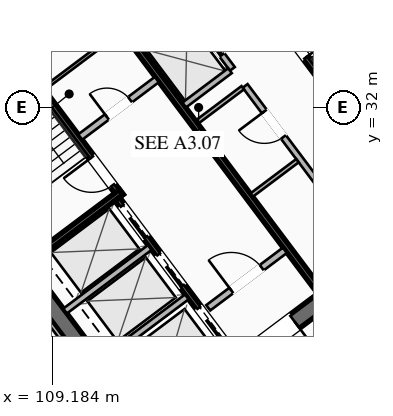
"""IFC4 building model, lengths in metres.
Left out: names, types, materials, properties, quantities, classifications, styles, units other than length and angle.
Written with IfcOpenShell. Run it as: python <this file> out.ifc"""

import sys

from ifc_helpers import new_model, si_unit, direction, frame, frame_2d, origin, place, context, subcontext, project, spatial, rectangle, extrude, element, fill, save


model = new_model("IFC4")
c1 = context("Model", 3, precision=1e-05, world=origin(), true_north=direction((0.0, 1.0)))
c2 = subcontext(c1, "Body", "Model", "MODEL_VIEW")
j1 = project(units=[si_unit("LENGTHUNIT", "METRE"), si_unit("PLANEANGLEUNIT", "RADIAN")], contexts=[c1])
p1 = place(None, origin())
s1 = spatial("IfcSite", under=j1, at=p1, CompositionType="ELEMENT")
p2 = place(p1, origin())
s2 = spatial("IfcBuilding", under=s1, at=p2, CompositionType="ELEMENT")
p3 = place(p2, frame((0.0, 0.0, 171.2)))
s3 = spatial("IfcBuildingStorey", under=s2, at=p3, CompositionType="ELEMENT", Elevation=171.2)
for number, where, z_axis, x_axis in (
    (1, (112.436, 21.077, 0.0), (0.0, 0.0, 1.0), (-0.6, 0.8, 0.0)),
    (2, (115.564, 42.923, 0.0), (0.0, 0.0, 1.0), (0.6, -0.8, 0.0)),
):
    element("IfcWall", number, at=place(p3, frame(where, z_axis=z_axis, x_axis=x_axis)), inside=s3, PredefinedType="SHEAR", context=c2, shape_type="SweptSolid", body=[
        extrude(rectangle(XDim=15.6, YDim=0.55, at=frame_2d((7.8, 0.0))), origin(), (0.0, 0.0, 1.0), 3.55),
    ])
p4 = place(p3, frame((124.539, 30.498, 0.0), z_axis=(0.0, 0.0, 1.0), x_axis=(-0.799998054672, -0.600002593761, 0.0)))
e3 = element("IfcWall", 3, at=p4, inside=s3, PredefinedType="SHEAR", context=c2, shape_type="SweptSolid", body=[
    extrude(rectangle(XDim=15.06, YDim=0.55, at=frame_2d((7.53, 0.0))), origin(), (0.0, 0.0, 1.0), 3.55),
])
p5 = place(p4, frame((9.23, 0.0, 0.0)))
e4 = element("IfcOpeningElement", 4, at=p5, cuts=e3, PredefinedType="OPENING", context=c2, shape_type="SweptSolid", body=[
    extrude(rectangle(XDim=1.25, YDim=2.25, at=frame_2d((0.625, 1.125))), frame((0.0, 0.285, 0.0), z_axis=(0.0, -1.0, 0.0), x_axis=(1.0, 0.0, 0.0)), (0.0, 0.0, 1.0), 0.57),
])
p6 = place(p4, frame((4.18, 0.0, 0.0)))
e5 = element("IfcOpeningElement", 5, at=p6, cuts=e3, PredefinedType="OPENING", context=c2, shape_type="SweptSolid", body=[
    extrude(rectangle(XDim=1.25, YDim=2.25, at=frame_2d((0.625, 1.125))), frame((0.0, 0.285, 0.0), z_axis=(0.0, -1.0, 0.0), x_axis=(1.0, 0.0, 0.0)), (0.0, 0.0, 1.0), 0.57),
])
p7 = place(p3, frame((103.461, 33.502, 0.0), z_axis=(0.0, 0.0, 1.0), x_axis=(0.799998054672, 0.600002593761, 0.0)))
e6 = element("IfcWall", 6, at=p7, inside=s3, PredefinedType="SHEAR", context=c2, shape_type="SweptSolid", body=[
    extrude(rectangle(XDim=15.06, YDim=0.55, at=frame_2d((7.53, 0.0))), origin(), (0.0, 0.0, 1.0), 3.55),
])
p8 = place(p7, frame((4.58, 0.0, 0.0)))
e7 = element("IfcOpeningElement", 7, at=p8, cuts=e6, PredefinedType="OPENING", context=c2, shape_type="SweptSolid", body=[
    extrude(rectangle(XDim=1.25, YDim=2.25, at=frame_2d((0.625, 1.125))), frame((0.0, 0.285, 0.0), z_axis=(0.0, -1.0, 0.0), x_axis=(1.0, 0.0, 0.0)), (0.0, 0.0, 1.0), 0.57),
])
p9 = place(p7, frame((9.63, 0.0, 0.0)))
e8 = element("IfcOpeningElement", 8, at=p9, cuts=e6, PredefinedType="OPENING", context=c2, shape_type="SweptSolid", body=[
    extrude(rectangle(XDim=1.25, YDim=2.25, at=frame_2d((0.625, 1.125))), frame((0.0, 0.285, 0.0), z_axis=(0.0, -1.0, 0.0), x_axis=(1.0, 0.0, 0.0)), (0.0, 0.0, 1.0), 0.57),
])
p10 = place(p3, frame((111.44, 29.08, 0.0), z_axis=(0.0, 0.0, 1.0), x_axis=(-0.59999029481, 0.8000072788, 0.0)))
e9 = element("IfcWall", 9, at=p10, inside=s3, PredefinedType="SHEAR", context=c2, shape_type="SweptSolid", body=[
    extrude(rectangle(XDim=8.05, YDim=0.2, at=frame_2d((4.025, 0.0))), origin(), (0.0, 0.0, 1.0), 3.37),
])
p11 = place(p10, frame((0.45, 0.0, 0.0)))
e10 = element("IfcOpeningElement", 10, at=p11, cuts=e9, PredefinedType="OPENING", context=c2, shape_type="SweptSolid", body=[
    extrude(rectangle(XDim=1.15, YDim=2.2, at=frame_2d((0.575, 1.1))), frame((0.0, 0.11, 0.0), z_axis=(0.0, -1.0, 0.0), x_axis=(1.0, 0.0, 0.0)), (0.0, 0.0, 1.0), 0.22),
])
p12 = place(p3, frame((108.396, 26.922, 0.0), z_axis=(0.0, 0.0, 1.0), x_axis=(0.800015298837, 0.599979601008, 0.0)))
e11 = element("IfcWall", 11, at=p12, inside=s3, PredefinedType="SHEAR", context=c2, shape_type="SweptSolid", body=[
    extrude(rectangle(XDim=3.83, YDim=0.2, at=frame_2d((1.915, 0.0))), origin(), (0.0, 0.0, 1.0), 3.37),
])
p13 = place(p3, frame((116.56, 34.92, 0.0), z_axis=(0.0, 0.0, 1.0), x_axis=(0.59999029481, -0.8000072788, 0.0)))
e12 = element("IfcWall", 12, at=p13, inside=s3, PredefinedType="SHEAR", context=c2, shape_type="SweptSolid", body=[
    extrude(rectangle(XDim=8.05, YDim=0.2, at=frame_2d((4.025, 0.0))), origin(), (0.0, 0.0, 1.0), 3.37),
])
p14 = place(p13, frame((0.45, 0.0, 0.0)))
e13 = element("IfcOpeningElement", 13, at=p14, cuts=e12, PredefinedType="OPENING", context=c2, shape_type="SweptSolid", body=[
    extrude(rectangle(XDim=1.15, YDim=2.2, at=frame_2d((0.575, 1.1))), frame((0.0, 0.11, 0.0), z_axis=(0.0, -1.0, 0.0), x_axis=(1.0, 0.0, 0.0)), (0.0, 0.0, 1.0), 0.22),
])
p15 = place(p3, frame((117.998, 25.936, 0.0), z_axis=(0.0, 0.0, 1.0), x_axis=(-0.600002693989, 0.799997979501, 0.0)))
e14 = element("IfcWall", 14, at=p15, inside=s3, PredefinedType="SHEAR", context=c2, shape_type="SweptSolid", body=[
    extrude(rectangle(XDim=14.5, YDim=0.2, at=frame_2d((7.25, 0.0))), origin(), (0.0, 0.0, 1.0), 3.37),
])
p16 = place(p3, frame((110.104, 31.028, 0.0), z_axis=(0.0, 0.0, 1.0), x_axis=(0.800018601094, 0.59997519774, 0.0)))
e15 = element("IfcWall", 15, at=p16, inside=s3, PredefinedType="SOLIDWALL", context=c2, shape_type="SweptSolid", body=[
    extrude(rectangle(XDim=3.15, YDim=0.22, at=frame_2d((1.575, 0.0))), origin(), (0.0, 0.0, 1.0), 2.723),
])
p17 = place(p16, frame((1.1, 0.0, 0.0)))
e16 = element("IfcOpeningElement", 16, at=p17, cuts=e15, PredefinedType="OPENING", context=c2, shape_type="SweptSolid", body=[
    extrude(rectangle(XDim=0.95, YDim=2.05, at=frame_2d((0.475, 1.025))), frame((0.0, 0.12, 0.0), z_axis=(0.0, -1.0, 0.0), x_axis=(1.0, 0.0, 0.0)), (0.0, 0.0, 1.0), 0.24),
])
p18 = place(p3, frame((114.316, 25.412, 0.0), z_axis=(0.0, 0.0, 1.0), x_axis=(0.800018601094, 0.59997519774, 0.0)))
e17 = element("IfcWall", 17, at=p18, inside=s3, PredefinedType="SOLIDWALL", context=c2, shape_type="SweptSolid", body=[
    extrude(rectangle(XDim=3.15, YDim=0.22, at=frame_2d((1.575, 0.0))), origin(), (0.0, 0.0, 1.0), 2.723),
])
p19 = place(p18, frame((0.95, 0.0, 0.0)))
e18 = element("IfcOpeningElement", 18, at=p19, cuts=e17, PredefinedType="OPENING", context=c2, shape_type="SweptSolid", body=[
    extrude(rectangle(XDim=1.25, YDim=2.25, at=frame_2d((0.625, 1.125))), frame((0.0, 0.12, 0.0), z_axis=(0.0, -1.0, 0.0), x_axis=(1.0, 0.0, 0.0)), (0.0, 0.0, 1.0), 0.24),
])
p20 = place(p3, frame((115.19, 23.83, 0.0), z_axis=(0.0, 0.0, 1.0), x_axis=(-0.599993943644, 0.800004542231, 0.0)))
e19 = element("IfcWall", 19, at=p20, inside=s3, PredefinedType="SHEAR", context=c2, shape_type="SweptSolid", body=[
    extrude(rectangle(XDim=6.45, YDim=0.2, at=frame_2d((3.225, 0.0))), origin(), (0.0, 0.0, 1.0), 3.37),
])
p21 = place(p20, frame((4.875, 0.0, 0.0)))
e20 = element("IfcOpeningElement", 20, at=p21, cuts=e19, PredefinedType="OPENING", context=c2, shape_type="SweptSolid", body=[
    extrude(rectangle(XDim=1.3, YDim=2.25, at=frame_2d((0.65, 1.125))), frame((0.0, 0.11, 0.0), z_axis=(0.0, -1.0, 0.0), x_axis=(1.0, 0.0, 0.0)), (0.0, 0.0, 1.0), 0.22),
])
p22 = place(p20, frame((2.875, 0.0, 0.0)))
e21 = element("IfcOpeningElement", 21, at=p22, cuts=e19, PredefinedType="OPENING", context=c2, shape_type="SweptSolid", body=[
    extrude(rectangle(XDim=1.3, YDim=2.25, at=frame_2d((0.65, 1.125))), frame((0.0, 0.11, 0.0), z_axis=(0.0, -1.0, 0.0), x_axis=(1.0, 0.0, 0.0)), (0.0, 0.0, 1.0), 0.22),
])
p23 = place(p20, frame((0.675, 0.0, 0.0)))
e22 = element("IfcOpeningElement", 22, at=p23, cuts=e19, PredefinedType="OPENING", context=c2, shape_type="SweptSolid", body=[
    extrude(rectangle(XDim=1.3, YDim=2.25, at=frame_2d((0.65, 1.125))), frame((0.0, 0.11, 0.0), z_axis=(0.0, -1.0, 0.0), x_axis=(1.0, 0.0, 0.0)), (0.0, 0.0, 1.0), 0.22),
])
for number, where, z_axis, x_axis in (
    (23, (110.826, 23.682, 0.0), (0.0, 0.0, 1.0), (0.8, 0.6, 0.0)),
    (24, (109.608, 25.306, 0.0), (0.0, 0.0, 1.0), (0.8, 0.6, 0.0)),
):
    element("IfcWall", number, at=place(p3, frame(where, z_axis=z_axis, x_axis=x_axis)), inside=s3, PredefinedType="SOLIDWALL", context=c2, shape_type="SweptSolid", body=[
        extrude(rectangle(XDim=3.48, YDim=0.2, at=frame_2d((1.74, 0.0))), origin(), (0.0, 0.0, 1.0), 3.37),
    ])
p24 = place(p3, frame((108.91, 32.62, 0.0), z_axis=(0.0, 0.0, 1.0), x_axis=(0.800018601094, 0.59997519774, 0.0)))
e25 = element("IfcWall", 25, at=p24, inside=s3, PredefinedType="PARTITIONING", context=c2, shape_type="SweptSolid", body=[
    extrude(rectangle(XDim=3.15, YDim=0.11, at=frame_2d((1.575, 0.0))), origin(), (0.0, 0.0, 1.0), 2.723),
])
p25 = place(p3, frame((119.67, 27.19, 0.0), z_axis=(0.0, 0.0, 1.0), x_axis=(-0.599988677396, 0.800008491828, 0.0)))
e26 = element("IfcWall", 26, at=p25, inside=s3, PredefinedType="SOLIDWALL", context=c2, shape_type="SweptSolid", body=[
    extrude(rectangle(XDim=6.9, YDim=0.2, at=frame_2d((3.45, 0.0))), origin(), (0.0, 0.0, 1.0), 2.723),
])
p26 = place(p25, frame((0.85, 0.0, 0.0)))
e27 = element("IfcOpeningElement", 27, at=p26, cuts=e26, PredefinedType="OPENING", context=c2, shape_type="SweptSolid", body=[
    extrude(rectangle(XDim=0.95, YDim=2.05, at=frame_2d((0.475, 1.025))), frame((0.0, 0.11, 0.0), z_axis=(0.0, -1.0, 0.0), x_axis=(1.0, 0.0, 0.0)), (0.0, 0.0, 1.0), 0.22),
])
p27 = place(p25, frame((4.8, 0.0, 0.0)))
e28 = element("IfcOpeningElement", 28, at=p27, cuts=e26, PredefinedType="OPENING", context=c2, shape_type="SweptSolid", body=[
    extrude(rectangle(XDim=1.05, YDim=2.2, at=frame_2d((0.525, 1.1))), frame((0.0, 0.11, 0.0), z_axis=(0.0, -1.0, 0.0), x_axis=(1.0, 0.0, 0.0)), (0.0, 0.0, 1.0), 0.22),
])
for number, where, z_axis, x_axis in (
    (29, (113.946, 31.522, 0.0), (0.0, 0.0, 1.0), (0.8, 0.6, 0.0)),
    (30, (115.746, 29.122, 0.0), (0.0, 0.0, 1.0), (0.8, 0.6, 0.0)),
):
    element("IfcWall", number, at=place(p3, frame(where, z_axis=z_axis, x_axis=x_axis)), inside=s3, PredefinedType="PARTITIONING", context=c2, shape_type="SweptSolid", body=[
        extrude(rectangle(XDim=1.88, YDim=0.135, at=frame_2d((0.94, 0.0))), origin(), (0.0, 0.0, 1.0), 2.723),
    ])
p28 = place(p3, frame((115.11, 33.27, 0.0), z_axis=(0.0, 0.0, 1.0), x_axis=(-0.600011322243, 0.799991508192, 0.0)))
e31 = element("IfcWall", 31, at=p28, inside=s3, PredefinedType="SOLIDWALL", context=c2, shape_type="SweptSolid", body=[
    extrude(rectangle(XDim=6.9, YDim=0.2, at=frame_2d((3.45, 0.0))), origin(), (0.0, 0.0, 1.0), 3.37),
])
p29 = place(p28, frame((0.575, 0.0, 0.0)))
e32 = element("IfcOpeningElement", 32, at=p29, cuts=e31, PredefinedType="OPENING", context=c2, shape_type="SweptSolid", body=[
    extrude(rectangle(XDim=1.1, YDim=2.2, at=frame_2d((0.55, 1.1))), frame((0.0, 0.11, 0.0), z_axis=(0.0, -1.0, 0.0), x_axis=(1.0, 0.0, 0.0)), (0.0, 0.0, 1.0), 0.22),
])
p30 = place(p28, frame((2.825, 0.0, 0.0)))
e33 = element("IfcOpeningElement", 33, at=p30, cuts=e31, PredefinedType="OPENING", context=c2, shape_type="SweptSolid", body=[
    extrude(rectangle(XDim=1.1, YDim=2.2, at=frame_2d((0.55, 1.1))), frame((0.0, 0.11, 0.0), z_axis=(0.0, -1.0, 0.0), x_axis=(1.0, 0.0, 0.0)), (0.0, 0.0, 1.0), 0.22),
])
p31 = place(p28, frame((5.075, 0.0, 0.0)))
e34 = element("IfcOpeningElement", 34, at=p31, cuts=e31, PredefinedType="OPENING", context=c2, shape_type="SweptSolid", body=[
    extrude(rectangle(XDim=1.1, YDim=2.2, at=frame_2d((0.55, 1.1))), frame((0.0, 0.11, 0.0), z_axis=(0.0, -1.0, 0.0), x_axis=(1.0, 0.0, 0.0)), (0.0, 0.0, 1.0), 0.22),
])
p32 = place(p3, frame((113.526, 32.082, 0.0), z_axis=(0.0, 0.0, 1.0), x_axis=(0.800046745961, 0.599937666993, 0.0)))
e35 = element("IfcWall", 35, at=p32, inside=s3, PredefinedType="SOLIDWALL", context=c2, shape_type="SweptSolid", body=[
    extrude(rectangle(XDim=1.88, YDim=0.2, at=frame_2d((0.94, 0.0))), origin(), (0.0, 0.0, 1.0), 3.37),
])
p33 = place(p3, frame((112.176, 33.882, 0.0), z_axis=(0.0, 0.0, 1.0), x_axis=(0.8, 0.6, 0.0)))
e36 = element("IfcWall", 36, at=p33, inside=s3, PredefinedType="SOLIDWALL", context=c2, shape_type="SweptSolid", body=[
    extrude(rectangle(XDim=1.88, YDim=0.2, at=frame_2d((0.94, 0.0))), origin(), (0.0, 0.0, 1.0), 3.37),
])
p34 = place(p3, frame((96.058, 32.006, 0.0), z_axis=(0.0, 0.0, 1.0), x_axis=(0.8, 0.6, 0.0)))
e37 = element("IfcWall", 37, at=p34, inside=s3, PredefinedType="PARTITIONING", context=c2, shape_type="SweptSolid", body=[
    extrude(rectangle(XDim=28.7, YDim=0.135, at=frame_2d((14.35, 0.0))), origin(), (0.0, 0.0, 1.0), 2.723),
])
p35 = place(p34, frame((0.3, 0.0, 0.0)))
e38 = element("IfcOpeningElement", 38, at=p35, cuts=e37, PredefinedType="OPENING", context=c2, shape_type="SweptSolid", body=[
    extrude(rectangle(XDim=0.95, YDim=2.05, at=frame_2d((0.475, 1.025))), frame((0.0, 0.077, 0.0), z_axis=(0.0, -1.0, 0.0), x_axis=(1.0, 0.0, 0.0)), (0.0, 0.0, 1.0), 0.155),
])
p36 = place(p34, frame((10.01, 0.0, 0.0)))
e39 = element("IfcOpeningElement", 39, at=p36, cuts=e37, PredefinedType="OPENING", context=c2, shape_type="SweptSolid", body=[
    extrude(rectangle(XDim=0.95, YDim=2.05, at=frame_2d((0.475, 1.025))), frame((0.0, 0.077, 0.0), z_axis=(0.0, -1.0, 0.0), x_axis=(1.0, 0.0, 0.0)), (0.0, 0.0, 1.0), 0.155),
])
p37 = place(p34, frame((14.033, 0.0, 0.0)))
e40 = element("IfcOpeningElement", 40, at=p37, cuts=e37, PredefinedType="OPENING", context=c2, shape_type="SweptSolid", body=[
    extrude(rectangle(XDim=0.95, YDim=2.05, at=frame_2d((0.475, 1.025))), frame((0.0, 0.077, 0.0), z_axis=(0.0, -1.0, 0.0), x_axis=(1.0, 0.0, 0.0)), (0.0, 0.0, 1.0), 0.155),
])
p38 = place(p34, frame((27.45, 0.0, 0.0)))
e41 = element("IfcOpeningElement", 41, at=p38, cuts=e37, PredefinedType="OPENING", context=c2, shape_type="SweptSolid", body=[
    extrude(rectangle(XDim=0.95, YDim=2.05, at=frame_2d((0.475, 1.025))), frame((0.0, 0.077, 0.0), z_axis=(0.0, -1.0, 0.0), x_axis=(1.0, 0.0, 0.0)), (0.0, 0.0, 1.0), 0.155),
])
p39 = place(p3, frame((132.11, 31.77, 0.0), z_axis=(0.0, 0.0, 1.0), x_axis=(-0.800003062365, -0.599995916825, 0.0)))
e42 = element("IfcWall", 42, at=p39, inside=s3, PredefinedType="PARTITIONING", context=c2, shape_type="SweptSolid", body=[
    extrude(rectangle(XDim=28.7, YDim=0.135, at=frame_2d((14.35, 0.0))), origin(), (0.0, 0.0, 1.0), 2.723),
])
p40 = place(p39, frame((27.37, 0.0, 0.0)))
e43 = element("IfcOpeningElement", 43, at=p40, cuts=e42, PredefinedType="OPENING", context=c2, shape_type="SweptSolid", body=[
    extrude(rectangle(XDim=0.95, YDim=2.05, at=frame_2d((0.475, 1.025))), frame((0.0, 0.077, 0.0), z_axis=(0.0, -1.0, 0.0), x_axis=(1.0, 0.0, 0.0)), (0.0, 0.0, 1.0), 0.155),
])
p41 = place(p39, frame((17.698, 0.0, 0.0)))
e44 = element("IfcOpeningElement", 44, at=p41, cuts=e42, PredefinedType="OPENING", context=c2, shape_type="SweptSolid", body=[
    extrude(rectangle(XDim=0.95, YDim=2.05, at=frame_2d((0.475, 1.025))), frame((0.0, 0.077, 0.0), z_axis=(0.0, -1.0, 0.0), x_axis=(1.0, 0.0, 0.0)), (0.0, 0.0, 1.0), 0.155),
])
p42 = place(p39, frame((13.639, 0.0, 0.0)))
e45 = element("IfcOpeningElement", 45, at=p42, cuts=e42, PredefinedType="OPENING", context=c2, shape_type="SweptSolid", body=[
    extrude(rectangle(XDim=0.95, YDim=2.05, at=frame_2d((0.475, 1.025))), frame((0.0, 0.077, 0.0), z_axis=(0.0, -1.0, 0.0), x_axis=(1.0, 0.0, 0.0)), (0.0, 0.0, 1.0), 0.155),
])
p43 = place(p39, frame((0.38, 0.0, 0.0)))
e46 = element("IfcOpeningElement", 46, at=p43, cuts=e42, PredefinedType="OPENING", context=c2, shape_type="SweptSolid", body=[
    extrude(rectangle(XDim=0.95, YDim=2.05, at=frame_2d((0.475, 1.025))), frame((0.0, 0.077, 0.0), z_axis=(0.0, -1.0, 0.0), x_axis=(1.0, 0.0, 0.0)), (0.0, 0.0, 1.0), 0.155),
])
p44 = place(p3, frame((112.104, 20.928, 0.0), z_axis=(0.0, 0.0, 1.0), x_axis=(-0.599994940075, 0.800003794918, 0.0)))
e47 = element("IfcWall", 47, at=p44, inside=s3, PredefinedType="PARTITIONING", context=c2, shape_type="SweptSolid", body=[
    extrude(rectangle(XDim=15.44, YDim=0.135, at=frame_2d((7.72, 0.0))), origin(), (0.0, 0.0, 1.0), 2.723),
])
p45 = place(p5, origin())
e48 = element("IfcDoor", 48, at=p45, inside=s3, OperationType="SINGLE_SWING_LEFT", PredefinedType="DOOR", context=c2, shape_type="SweptSolid", body=[
    extrude(rectangle(XDim=1.25, YDim=2.25, at=frame_2d((0.625, 1.125))), frame((0.0, 0.025, 0.0), z_axis=(0.0, -1.0, 0.0), x_axis=(1.0, 0.0, 0.0)), (0.0, 0.0, 1.0), 0.05),
])
fill(e4, e48)
p46 = place(p11, origin())
e49 = element("IfcDoor", 49, at=p46, inside=s3, OperationType="SINGLE_SWING_RIGHT", PredefinedType="DOOR", context=c2, shape_type="SweptSolid", body=[
    extrude(rectangle(XDim=1.15, YDim=2.2, at=frame_2d((0.575, 1.1))), frame((0.0, 0.025, 0.0), z_axis=(0.0, -1.0, 0.0), x_axis=(1.0, 0.0, 0.0)), (0.0, 0.0, 1.0), 0.05),
])
fill(e10, e49)
p47 = place(p14, origin())
e50 = element("IfcDoor", 50, at=p47, inside=s3, OperationType="SINGLE_SWING_RIGHT", PredefinedType="DOOR", context=c2, shape_type="SweptSolid", body=[
    extrude(rectangle(XDim=1.15, YDim=2.2, at=frame_2d((0.575, 1.1))), frame((0.0, 0.025, 0.0), z_axis=(0.0, -1.0, 0.0), x_axis=(1.0, 0.0, 0.0)), (0.0, 0.0, 1.0), 0.05),
])
fill(e13, e50)
p48 = place(p19, origin())
e51 = element("IfcDoor", 51, at=p48, inside=s3, OperationType="SINGLE_SWING_LEFT", PredefinedType="DOOR", context=c2, shape_type="SweptSolid", body=[
    extrude(rectangle(XDim=1.25, YDim=2.25, at=frame_2d((0.625, 1.125))), frame((0.0, 0.025, 0.0), z_axis=(0.0, -1.0, 0.0), x_axis=(1.0, 0.0, 0.0)), (0.0, 0.0, 1.0), 0.05),
])
fill(e18, e51)
p49 = place(p17, origin())
e52 = element("IfcDoor", 52, at=p49, inside=s3, OperationType="SINGLE_SWING_LEFT", PredefinedType="DOOR", context=c2, shape_type="SweptSolid", body=[
    extrude(rectangle(XDim=0.95, YDim=2.05, at=frame_2d((0.475, 1.025))), frame((0.0, 0.025, 0.0), z_axis=(0.0, -1.0, 0.0), x_axis=(1.0, 0.0, 0.0)), (0.0, 0.0, 1.0), 0.05),
])
fill(e16, e52)
p50 = place(p27, origin())
e53 = element("IfcDoor", 53, at=p50, inside=s3, OperationType="SINGLE_SWING_RIGHT", PredefinedType="DOOR", context=c2, shape_type="SweptSolid", body=[
    extrude(rectangle(XDim=1.05, YDim=2.2, at=frame_2d((0.525, 1.1))), frame((0.0, 0.025, 0.0), z_axis=(0.0, -1.0, 0.0), x_axis=(1.0, 0.0, 0.0)), (0.0, 0.0, 1.0), 0.05),
])
fill(e28, e53)
p51 = place(p21, origin())
e54 = element("IfcDoor", 54, at=p51, inside=s3, OperationType="SLIDING_TO_LEFT", PredefinedType="DOOR", context=c2, shape_type="SweptSolid", body=[
    extrude(rectangle(XDim=1.3, YDim=2.25, at=frame_2d((0.65, 1.125))), frame((0.0, 0.025, 0.0), z_axis=(0.0, -1.0, 0.0), x_axis=(1.0, 0.0, 0.0)), (0.0, 0.0, 1.0), 0.05),
])
fill(e20, e54)
p52 = place(p22, origin())
e55 = element("IfcDoor", 55, at=p52, inside=s3, OperationType="SLIDING_TO_LEFT", PredefinedType="DOOR", context=c2, shape_type="SweptSolid", body=[
    extrude(rectangle(XDim=1.3, YDim=2.25, at=frame_2d((0.65, 1.125))), frame((0.0, 0.025, 0.0), z_axis=(0.0, -1.0, 0.0), x_axis=(1.0, 0.0, 0.0)), (0.0, 0.0, 1.0), 0.05),
])
fill(e21, e55)
p53 = place(p23, origin())
e56 = element("IfcDoor", 56, at=p53, inside=s3, OperationType="SLIDING_TO_LEFT", PredefinedType="DOOR", context=c2, shape_type="SweptSolid", body=[
    extrude(rectangle(XDim=1.3, YDim=2.25, at=frame_2d((0.65, 1.125))), frame((0.0, 0.025, 0.0), z_axis=(0.0, -1.0, 0.0), x_axis=(1.0, 0.0, 0.0)), (0.0, 0.0, 1.0), 0.05),
])
fill(e22, e56)
p54 = place(p29, origin())
e57 = element("IfcDoor", 57, at=p54, inside=s3, OperationType="SLIDING_TO_LEFT", PredefinedType="DOOR", context=c2, shape_type="SweptSolid", body=[
    extrude(rectangle(XDim=1.1, YDim=2.2, at=frame_2d((0.55, 1.1))), frame((0.0, 0.025, 0.0), z_axis=(0.0, -1.0, 0.0), x_axis=(1.0, 0.0, 0.0)), (0.0, 0.0, 1.0), 0.05),
])
fill(e32, e57)
save(model, sys.argv[1])
